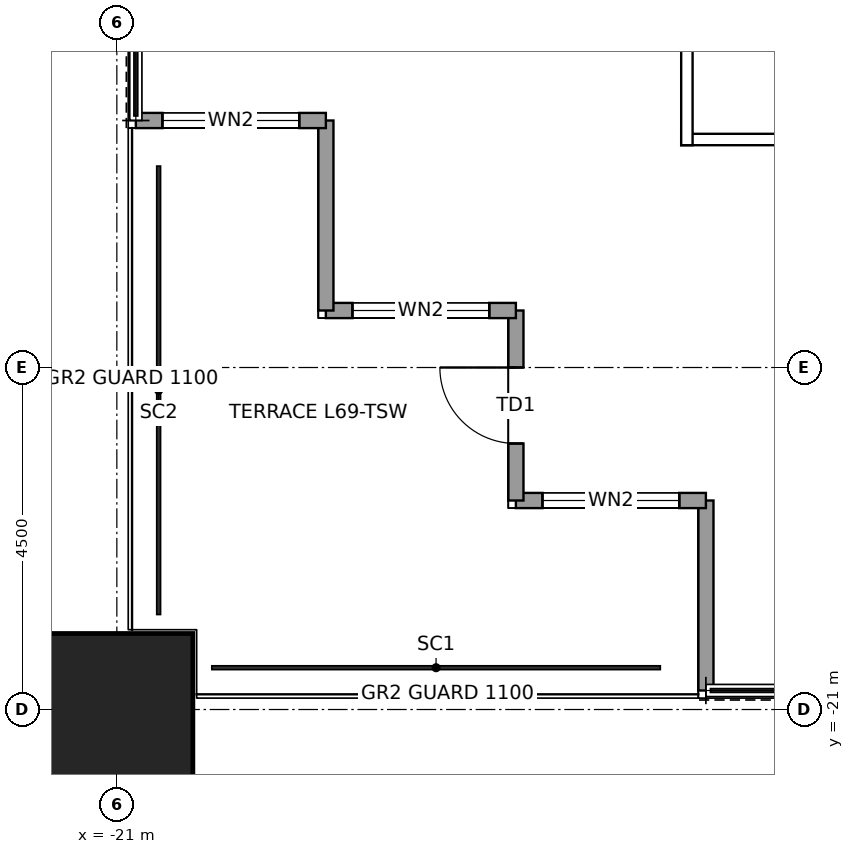
"""IFC4 building model, lengths in metres.
Left out: names, types, materials, properties, quantities, classifications, styles, units other than length and angle.
Written with IfcOpenShell. Run it as: python <this file> out.ifc"""

import sys

from ifc_helpers import new_model, si_unit, direction, frame, frame_2d, origin, origin_2d, place, context, subcontext, project, spatial, rectangle, hollow_rectangle, extrude, element, fill, save


model = new_model("IFC4")
c1 = context("Model", 3, precision=1e-05, world=origin(), true_north=direction((0.0, 1.0)))
c2 = subcontext(c1, "Body", "Model", "MODEL_VIEW")
j1 = project(units=[si_unit("LENGTHUNIT", "METRE"), si_unit("PLANEANGLEUNIT", "RADIAN")], contexts=[c1])
p1 = place(None, origin())
s1 = spatial("IfcSite", under=j1, at=p1, CompositionType="ELEMENT")
p2 = place(p1, origin())
s2 = spatial("IfcBuilding", under=s1, at=p2, CompositionType="ELEMENT")
p3 = place(p2, frame((0.0, 0.0, 311.9)))
s3 = spatial("IfcBuildingStorey", under=s2, at=p3, CompositionType="ELEMENT", Elevation=311.9)
p4 = place(p3, frame((-21.0, -21.0, 0.0), z_axis=(0.0, 0.0, 1.0), x_axis=(1.0, 0.0, 0.0)))
e1 = element("IfcColumn", 1, at=p4, inside=s3, PredefinedType="COLUMN", context=c2, shape_type="SweptSolid", body=[
    extrude(hollow_rectangle(XDim=2.0, YDim=2.0, WallThickness=0.095, at=origin_2d()), origin(), (0.0, 0.0, 1.0), 4.0),
])
p5 = place(p3, frame((-13.25, -20.75, 0.0), z_axis=(0.0, 0.0, 1.0), x_axis=(0.0, 1.0, 0.0)))
e2 = element("IfcWall", 2, at=p5, inside=s3, PredefinedType="SOLIDWALL", context=c2, shape_type="SweptSolid", body=[
    extrude(rectangle(XDim=2.5, YDim=0.2, at=frame_2d((1.25, 0.0))), origin(), (0.0, 0.0, 1.0), 3.85),
])
p6 = place(p3, frame((-13.25, -18.25, 0.0), z_axis=(0.0, 0.0, 1.0), x_axis=(-1.0, 0.0, 0.0)))
e3 = element("IfcWall", 3, at=p6, inside=s3, PredefinedType="SOLIDWALL", context=c2, shape_type="SweptSolid", body=[
    extrude(rectangle(XDim=2.5, YDim=0.2, at=frame_2d((1.25, 0.0))), origin(), (0.0, 0.0, 1.0), 3.85),
])
p7 = place(p6, frame((0.35, 0.0, 0.3)))
e4 = element("IfcOpeningElement", 4, at=p7, cuts=e3, PredefinedType="OPENING", context=c2, shape_type="SweptSolid", body=[
    extrude(rectangle(XDim=1.8, YDim=2.4, at=frame_2d((0.9, 1.2))), frame((0.0, 0.11, 0.0), z_axis=(0.0, -1.0, 0.0), x_axis=(1.0, 0.0, 0.0)), (0.0, 0.0, 1.0), 0.22),
])
p8 = place(p3, frame((-15.75, -18.25, 0.0), z_axis=(0.0, 0.0, 1.0), x_axis=(0.0, 1.0, 0.0)))
e5 = element("IfcWall", 5, at=p8, inside=s3, PredefinedType="SOLIDWALL", context=c2, shape_type="SweptSolid", body=[
    extrude(rectangle(XDim=2.5, YDim=0.2, at=frame_2d((1.25, 0.0))), origin(), (0.0, 0.0, 1.0), 3.317),
])
p9 = place(p8, frame((0.75, 0.0, 0.0)))
e6 = element("IfcOpeningElement", 6, at=p9, cuts=e5, PredefinedType="OPENING", context=c2, shape_type="SweptSolid", body=[
    extrude(rectangle(XDim=1.0, YDim=2.4, at=frame_2d((0.5, 1.2))), frame((0.0, 0.11, 0.0), z_axis=(0.0, -1.0, 0.0), x_axis=(1.0, 0.0, 0.0)), (0.0, 0.0, 1.0), 0.22),
])
p10 = place(p3, frame((-15.75, -15.75, 0.0), z_axis=(0.0, 0.0, 1.0), x_axis=(-1.0, 0.0, 0.0)))
e7 = element("IfcWall", 7, at=p10, inside=s3, PredefinedType="SOLIDWALL", context=c2, shape_type="SweptSolid", body=[
    extrude(rectangle(XDim=2.5, YDim=0.2, at=frame_2d((1.25, 0.0))), origin(), (0.0, 0.0, 1.0), 3.85),
])
p11 = place(p10, frame((0.35, 0.0, 0.3)))
e8 = element("IfcOpeningElement", 8, at=p11, cuts=e7, PredefinedType="OPENING", context=c2, shape_type="SweptSolid", body=[
    extrude(rectangle(XDim=1.8, YDim=2.4, at=frame_2d((0.9, 1.2))), frame((0.0, 0.11, 0.0), z_axis=(0.0, -1.0, 0.0), x_axis=(1.0, 0.0, 0.0)), (0.0, 0.0, 1.0), 0.22),
])
p12 = place(p3, frame((-18.25, -15.75, 0.0), z_axis=(0.0, 0.0, 1.0), x_axis=(0.0, 1.0, 0.0)))
e9 = element("IfcWall", 9, at=p12, inside=s3, PredefinedType="SOLIDWALL", context=c2, shape_type="SweptSolid", body=[
    extrude(rectangle(XDim=2.5, YDim=0.2, at=frame_2d((1.25, 0.0))), origin(), (0.0, 0.0, 1.0), 3.85),
])
p13 = place(p3, frame((-18.25, -13.25, 0.0), z_axis=(0.0, 0.0, 1.0), x_axis=(-1.0, 0.0, 0.0)))
e10 = element("IfcWall", 10, at=p13, inside=s3, PredefinedType="SOLIDWALL", context=c2, shape_type="SweptSolid", body=[
    extrude(rectangle(XDim=2.5, YDim=0.2, at=frame_2d((1.25, 0.0))), origin(), (0.0, 0.0, 1.0), 3.85),
])
p14 = place(p13, frame((0.35, 0.0, 0.3)))
e11 = element("IfcOpeningElement", 11, at=p14, cuts=e10, PredefinedType="OPENING", context=c2, shape_type="SweptSolid", body=[
    extrude(rectangle(XDim=1.8, YDim=2.4, at=frame_2d((0.9, 1.2))), frame((0.0, 0.11, 0.0), z_axis=(0.0, -1.0, 0.0), x_axis=(1.0, 0.0, 0.0)), (0.0, 0.0, 1.0), 0.22),
])
p15 = place(p3, frame((-13.575, -13.5, 0.0), z_axis=(0.0, 0.0, 1.0), x_axis=(1.0, 0.0, 0.0)))
e12 = element("IfcWall", 12, at=p15, inside=s3, PredefinedType="PARTITIONING", context=c2, shape_type="SweptSolid", body=[
    extrude(rectangle(XDim=13.65, YDim=0.15, at=frame_2d((6.825, 0.0))), origin(), (0.0, 0.0, 1.0), 3.85),
])
p16 = place(p15, frame((3.825, 0.0, 0.0)))
e13 = element("IfcOpeningElement", 13, at=p16, cuts=e12, PredefinedType="OPENING", context=c2, shape_type="SweptSolid", body=[
    extrude(rectangle(XDim=1.0, YDim=2.4, at=frame_2d((0.5, 1.2))), frame((0.0, 0.085, 0.0), z_axis=(0.0, -1.0, 0.0), x_axis=(1.0, 0.0, 0.0)), (0.0, 0.0, 1.0), 0.17),
])
p17 = place(p3, frame((-13.5, -13.575, 0.0), z_axis=(0.0, 0.0, 1.0), x_axis=(0.0, 1.0, 0.0)))
e14 = element("IfcWall", 14, at=p17, inside=s3, PredefinedType="PARTITIONING", context=c2, shape_type="SweptSolid", body=[
    extrude(rectangle(XDim=13.65, YDim=0.15, at=frame_2d((6.825, 0.0))), origin(), (0.0, 0.0, 1.0), 3.85),
])
p18 = place(p7, origin())
e15 = element("IfcWindow", 15, at=p18, inside=s3, PartitioningType="SINGLE_PANEL", PredefinedType="WINDOW", context=c2, shape_type="SweptSolid", body=[
    extrude(rectangle(XDim=1.8, YDim=2.4, at=frame_2d((0.9, 1.2))), frame((0.0, 0.03, 0.0), z_axis=(0.0, -1.0, 0.0), x_axis=(1.0, 0.0, 0.0)), (0.0, 0.0, 1.0), 0.06),
])
fill(e4, e15)
p19 = place(p9, origin())
e16 = element("IfcDoor", 16, at=p19, inside=s3, OperationType="SINGLE_SWING_RIGHT", PredefinedType="DOOR", context=c2, shape_type="SweptSolid", body=[
    extrude(rectangle(XDim=1.0, YDim=2.4, at=frame_2d((0.5, 1.2))), frame((0.0, 0.025, 0.0), z_axis=(0.0, -1.0, 0.0), x_axis=(1.0, 0.0, 0.0)), (0.0, 0.0, 1.0), 0.05),
])
fill(e6, e16)
p20 = place(p11, origin())
e17 = element("IfcWindow", 17, at=p20, inside=s3, PartitioningType="SINGLE_PANEL", PredefinedType="WINDOW", context=c2, shape_type="SweptSolid", body=[
    extrude(rectangle(XDim=1.8, YDim=2.4, at=frame_2d((0.9, 1.2))), frame((0.0, 0.03, 0.0), z_axis=(0.0, -1.0, 0.0), x_axis=(1.0, 0.0, 0.0)), (0.0, 0.0, 1.0), 0.06),
])
fill(e8, e17)
p21 = place(p14, origin())
e18 = element("IfcWindow", 18, at=p21, inside=s3, PartitioningType="SINGLE_PANEL", PredefinedType="WINDOW", context=c2, shape_type="SweptSolid", body=[
    extrude(rectangle(XDim=1.8, YDim=2.4, at=frame_2d((0.9, 1.2))), frame((0.0, 0.03, 0.0), z_axis=(0.0, -1.0, 0.0), x_axis=(1.0, 0.0, 0.0)), (0.0, 0.0, 1.0), 0.06),
])
fill(e11, e18)
save(model, sys.argv[1])
